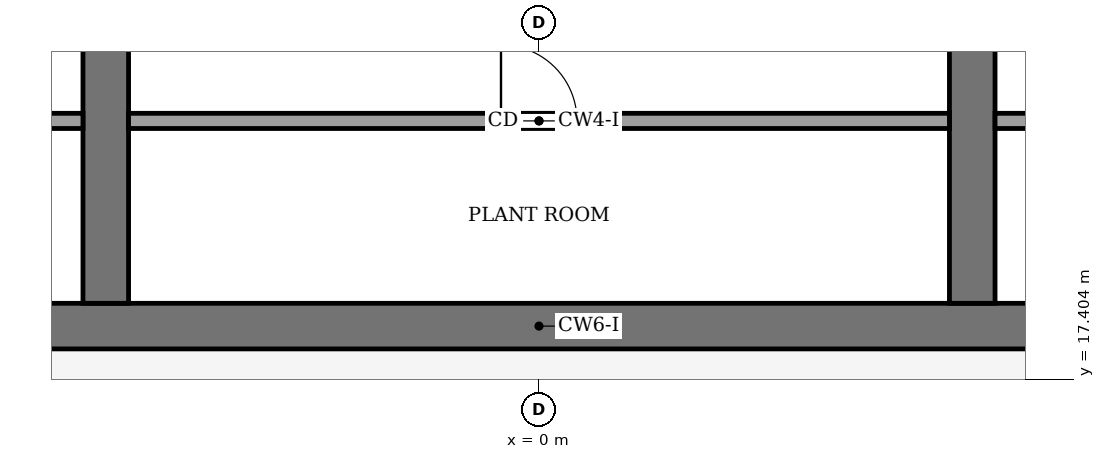
"""IFC4 building model, lengths in metres.
Left out: names, types, materials, properties, quantities, classifications, styles, units other than length and angle.
Written with IfcOpenShell. Run it as: python <this file> out.ifc"""

import sys

from ifc_helpers import new_model, si_unit, direction, frame, frame_2d, origin, place, context, subcontext, project, spatial, rectangle, extrude, element, fill, save


model = new_model("IFC4")
c1 = context("Model", 3, precision=1e-05, world=origin(), true_north=direction((0.0, 1.0)))
c2 = subcontext(c1, "Body", "Model", "MODEL_VIEW")
j1 = project(units=[si_unit("LENGTHUNIT", "METRE"), si_unit("PLANEANGLEUNIT", "RADIAN")], contexts=[c1])
p1 = place(None, origin())
s1 = spatial("IfcSite", under=j1, at=p1, CompositionType="ELEMENT")
p2 = place(p1, origin())
s2 = spatial("IfcBuilding", under=s1, at=p2, CompositionType="ELEMENT")
p3 = place(p2, frame((0.0, 0.0, 349.5)))
s3 = spatial("IfcBuildingStorey", under=s2, at=p3, CompositionType="ELEMENT", Elevation=349.5)
p4 = place(p3, frame((-13.2, 18.1, -0.15), z_axis=(0.0, 0.0, 1.0), x_axis=(1.0, 0.0, 0.0)))
e1 = element("IfcWall", 1, at=p4, inside=s3, PredefinedType="SHEAR", context=c2, shape_type="SweptSolid", body=[
    extrude(rectangle(XDim=26.4, YDim=0.6, at=frame_2d((13.2, 0.0))), origin(), (0.0, 0.0, 1.0), 5.0),
])
p5 = place(p3, frame((-5.7, 18.4, -0.15), z_axis=(0.0, 0.0, 1.0), x_axis=(0.0, 1.0, 0.0)))
e2 = element("IfcWall", 2, at=p5, inside=s3, PredefinedType="SHEAR", context=c2, shape_type="SweptSolid", body=[
    extrude(rectangle(XDim=19.2, YDim=0.6, at=frame_2d((9.6, 0.0))), origin(), (0.0, 0.0, 1.0), 5.0),
])
p6 = place(p5, frame((8.35, 0.0, 0.15)))
e3 = element("IfcOpeningElement", 3, at=p6, cuts=e2, PredefinedType="OPENING", context=c2, shape_type="SweptSolid", body=[
    extrude(rectangle(XDim=0.9, YDim=2.1, at=frame_2d((0.45, 1.05))), frame((0.0, 0.31, 0.0), z_axis=(0.0, -1.0, 0.0), x_axis=(1.0, 0.0, 0.0)), (0.0, 0.0, 1.0), 0.62),
])
p7 = place(p3, frame((5.7, 18.4, -0.15), z_axis=(0.0, 0.0, 1.0), x_axis=(0.0, 1.0, 0.0)))
e4 = element("IfcWall", 4, at=p7, inside=s3, PredefinedType="SHEAR", context=c2, shape_type="SweptSolid", body=[
    extrude(rectangle(XDim=19.2, YDim=0.6, at=frame_2d((9.6, 0.0))), origin(), (0.0, 0.0, 1.0), 5.0),
])
p8 = place(p7, frame((13.3, 0.0, 0.15)))
e5 = element("IfcOpeningElement", 5, at=p8, cuts=e4, PredefinedType="OPENING", context=c2, shape_type="SweptSolid", body=[
    extrude(rectangle(XDim=2.4, YDim=2.4, at=frame_2d((1.2, 1.2))), frame((0.0, 0.31, 0.0), z_axis=(0.0, -1.0, 0.0), x_axis=(1.0, 0.0, 0.0)), (0.0, 0.0, 1.0), 0.62),
])
p9 = place(p3, frame((-12.6, 20.8, 0.0), z_axis=(0.0, 0.0, 1.0), x_axis=(1.0, 0.0, 0.0)))
e6 = element("IfcWall", 6, at=p9, inside=s3, PredefinedType="PARTITIONING", context=c2, shape_type="SweptSolid", body=[
    extrude(rectangle(XDim=6.6, YDim=0.2, at=frame_2d((3.3, 0.0))), origin(), (0.0, 0.0, 1.0), 4.85),
])
p10 = place(p9, frame((2.8, 0.0, 0.0)))
e7 = element("IfcOpeningElement", 7, at=p10, cuts=e6, PredefinedType="OPENING", context=c2, shape_type="SweptSolid", body=[
    extrude(rectangle(XDim=1.0, YDim=2.1, at=frame_2d((0.5, 1.05))), frame((0.0, 0.11, 0.0), z_axis=(0.0, -1.0, 0.0), x_axis=(1.0, 0.0, 0.0)), (0.0, 0.0, 1.0), 0.22),
])
p11 = place(p3, frame((-5.4, 20.8, 0.0), z_axis=(0.0, 0.0, 1.0), x_axis=(1.0, 0.0, 0.0)))
e8 = element("IfcWall", 8, at=p11, inside=s3, PredefinedType="PARTITIONING", context=c2, shape_type="SweptSolid", body=[
    extrude(rectangle(XDim=10.8, YDim=0.2, at=frame_2d((5.4, 0.0))), origin(), (0.0, 0.0, 1.0), 4.85),
])
p12 = place(p11, frame((4.9, 0.0, 0.0)))
e9 = element("IfcOpeningElement", 9, at=p12, cuts=e8, PredefinedType="OPENING", context=c2, shape_type="SweptSolid", body=[
    extrude(rectangle(XDim=1.0, YDim=2.1, at=frame_2d((0.5, 1.05))), frame((0.0, 0.11, 0.0), z_axis=(0.0, -1.0, 0.0), x_axis=(1.0, 0.0, 0.0)), (0.0, 0.0, 1.0), 0.22),
])
p13 = place(p3, frame((6.0, 20.8, 0.0), z_axis=(0.0, 0.0, 1.0), x_axis=(1.0, 0.0, 0.0)))
e10 = element("IfcWall", 10, at=p13, inside=s3, PredefinedType="PARTITIONING", context=c2, shape_type="SweptSolid", body=[
    extrude(rectangle(XDim=6.6, YDim=0.2, at=frame_2d((3.3, 0.0))), origin(), (0.0, 0.0, 1.0), 4.85),
])
p14 = place(p13, frame((2.8, 0.0, 0.0)))
e11 = element("IfcOpeningElement", 11, at=p14, cuts=e10, PredefinedType="OPENING", context=c2, shape_type="SweptSolid", body=[
    extrude(rectangle(XDim=1.0, YDim=2.1, at=frame_2d((0.5, 1.05))), frame((0.0, 0.11, 0.0), z_axis=(0.0, -1.0, 0.0), x_axis=(1.0, 0.0, 0.0)), (0.0, 0.0, 1.0), 0.22),
])
p15 = place(p12, origin())
e12 = element("IfcDoor", 12, at=p15, inside=s3, OperationType="SINGLE_SWING_LEFT", PredefinedType="DOOR", context=c2, shape_type="SweptSolid", body=[
    extrude(rectangle(XDim=1.0, YDim=2.1, at=frame_2d((0.5, 1.05))), frame((0.0, 0.025, 0.0), z_axis=(0.0, -1.0, 0.0), x_axis=(1.0, 0.0, 0.0)), (0.0, 0.0, 1.0), 0.05),
])
fill(e9, e12)
save(model, sys.argv[1])
